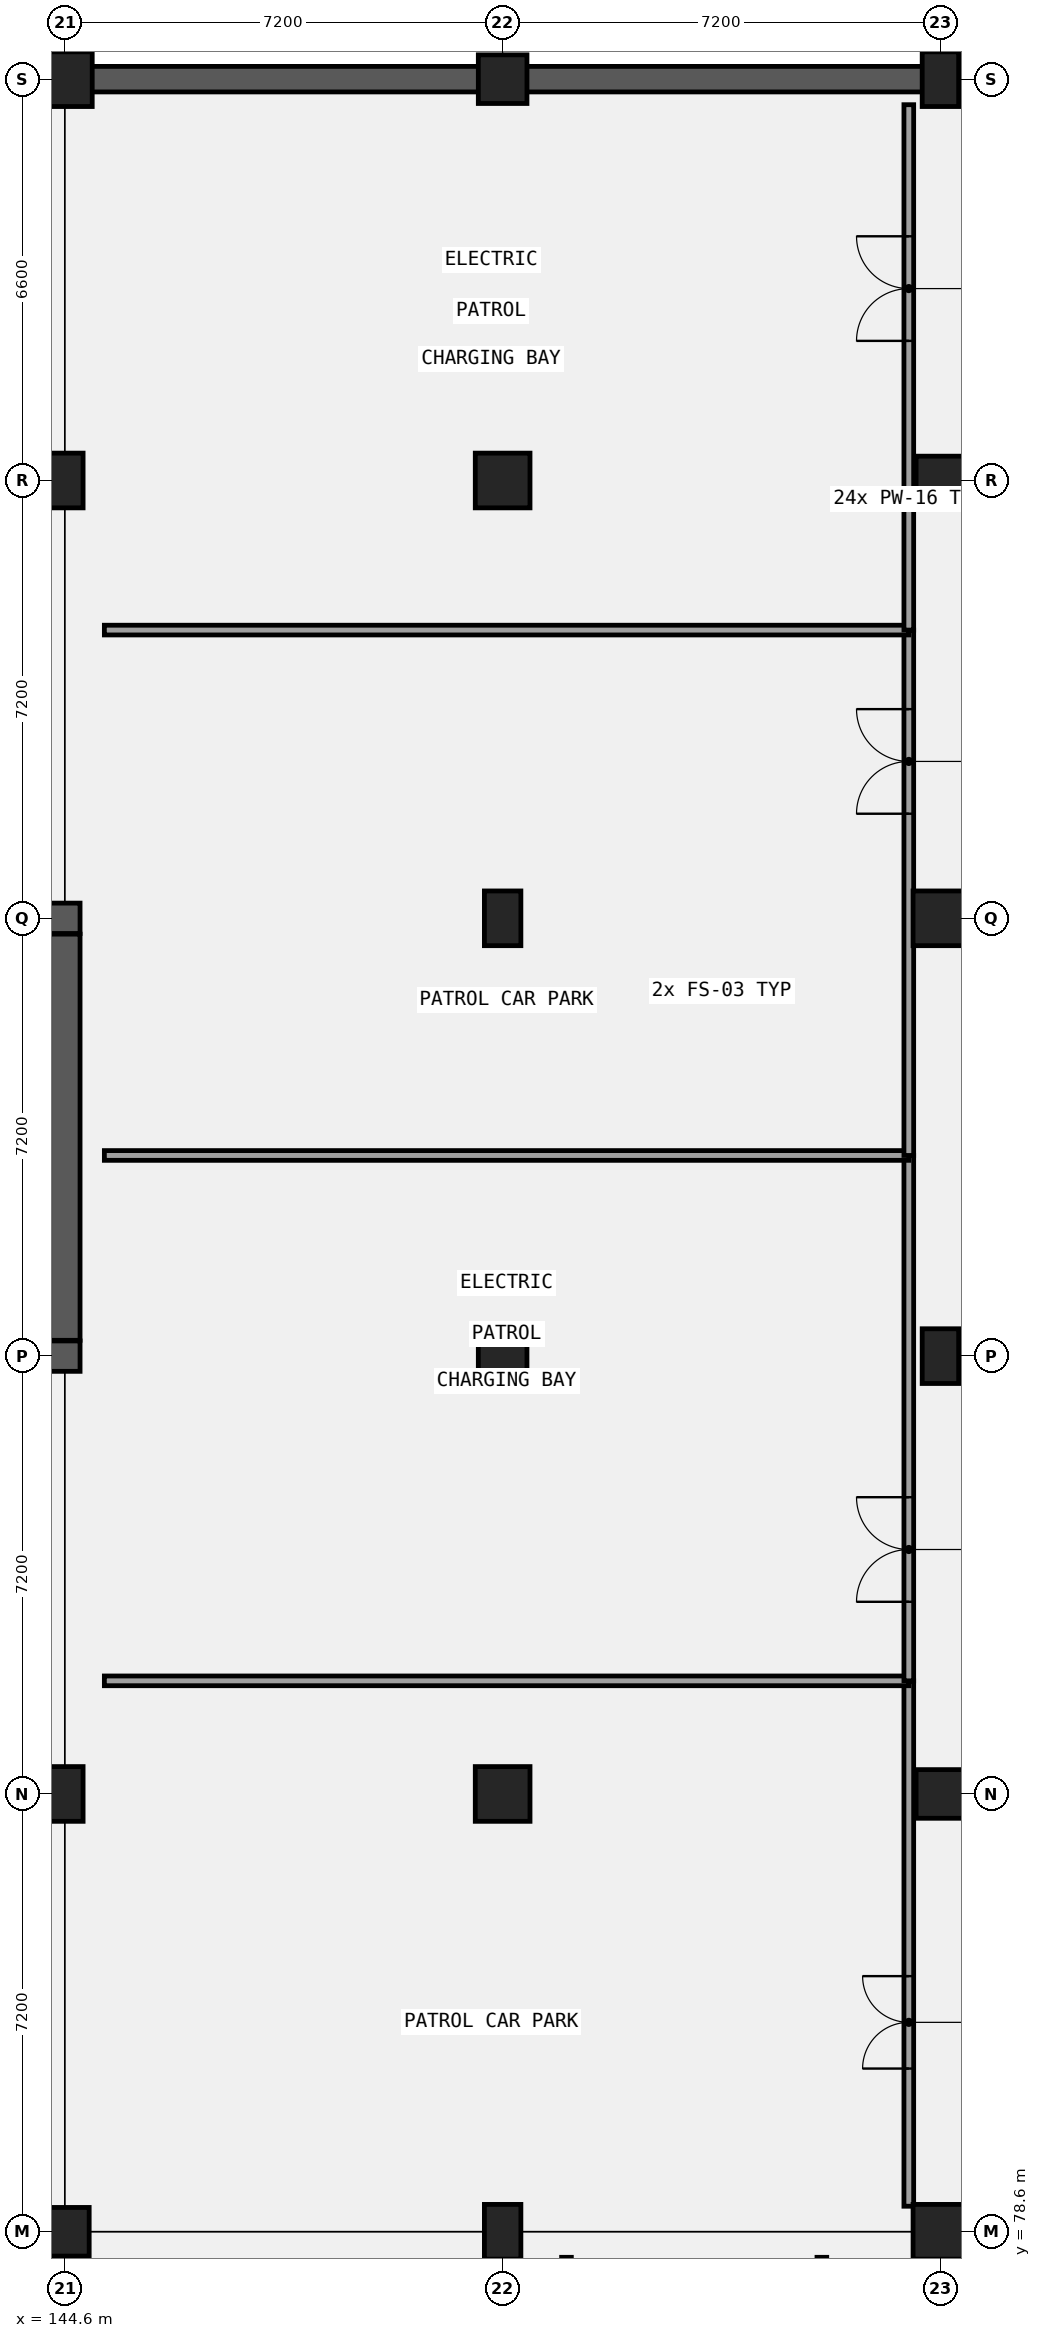
"""IFC4 building model, lengths in metres.
Left out: names, types, materials, properties, quantities, classifications, styles, units other than length and angle.
Written with IfcOpenShell. Run it as: python <this file> out.ifc"""

import sys

from ifc_helpers import new_model, si_unit, direction, frame, frame_2d, origin, origin_2d, place, context, subcontext, project, spatial, rectangle, extrude, element, fill, save


model = new_model("IFC4")
c1 = context("Model", 3, precision=1e-05, world=origin(), true_north=direction((0.0, 1.0)))
c2 = subcontext(c1, "Body", "Model", "MODEL_VIEW")
j1 = project(units=[si_unit("LENGTHUNIT", "METRE"), si_unit("PLANEANGLEUNIT", "RADIAN")], contexts=[c1])
p1 = place(None, origin())
s1 = spatial("IfcSite", under=j1, at=p1, CompositionType="ELEMENT")
p2 = place(p1, origin())
s2 = spatial("IfcBuilding", under=s1, at=p2, CompositionType="ELEMENT")
p3 = place(p2, frame((0.0, 0.0, -4.2)))
s3 = spatial("IfcBuildingStorey", under=s2, at=p3, CompositionType="ELEMENT", Elevation=-4.2)
p4 = place(p3, frame((108.39, 114.0, 0.0), z_axis=(0.0, 0.0, 1.0), x_axis=(1.0, 0.0, 0.0)))
e1 = element("IfcWall", 1, at=p4, inside=s3, PredefinedType="USERDEFINED", context=c2, shape_type="SweptSolid", body=[
    extrude(rectangle(XDim=36.42, YDim=0.42, at=frame_2d((18.21, 0.0))), origin(), (0.0, 0.0, 1.0), 3.13),
])
p5 = place(p3, frame((144.39, 114.0, 0.0), z_axis=(0.0, 0.0, 1.0), x_axis=(1.0, 0.0, 0.0)))
e2 = element("IfcWall", 2, at=p5, inside=s3, PredefinedType="USERDEFINED", context=c2, shape_type="SweptSolid", body=[
    extrude(rectangle(XDim=22.02, YDim=0.42, at=frame_2d((11.01, 0.0))), origin(), (0.0, 0.0, 1.0), 3.13),
])
p6 = place(p3, frame((144.6, 35.6, 0.0), z_axis=(0.0, 0.0, 1.0), x_axis=(0.0, 1.0, 0.0)))
e3 = element("IfcWall", 3, at=p6, inside=s3, PredefinedType="USERDEFINED", context=c2, shape_type="SweptSolid", body=[
    extrude(rectangle(XDim=42.8, YDim=0.42, at=frame_2d((21.4, 0.0))), origin(), (0.0, 0.0, 1.0), 2.98),
])
p7 = place(p3, frame((144.81, 78.6, 0.0), z_axis=(0.0, 0.0, 1.0), x_axis=(-1.0, 0.0, 0.0)))
e4 = element("IfcWall", 4, at=p7, inside=s3, PredefinedType="USERDEFINED", context=c2, shape_type="SweptSolid", body=[
    extrude(rectangle(XDim=36.42, YDim=0.42, at=frame_2d((18.21, 0.0))), origin(), (0.0, 0.0, 1.0), 3.13),
])
p8 = place(p3, frame((129.95, 100.2, 0.0), z_axis=(0.0, 0.0, 1.0), x_axis=(1.0, 0.0, 0.0)))
e5 = element("IfcWall", 5, at=p8, inside=s3, PredefinedType="SHEAR", context=c2, shape_type="SweptSolid", body=[
    extrude(rectangle(XDim=14.9, YDim=0.5, at=frame_2d((7.45, 0.0))), origin(), (0.0, 0.0, 1.0), 4.2),
])
p9 = place(p3, frame((129.95, 93.0, 0.0), z_axis=(0.0, 0.0, 1.0), x_axis=(1.0, 0.0, 0.0)))
e6 = element("IfcWall", 6, at=p9, inside=s3, PredefinedType="SHEAR", context=c2, shape_type="SweptSolid", body=[
    extrude(rectangle(XDim=14.9, YDim=0.5, at=frame_2d((7.45, 0.0))), origin(), (0.0, 0.0, 1.0), 4.2),
])
p10 = place(p9, frame((3.8, 0.0, 0.0)))
e7 = element("IfcOpeningElement", 7, at=p10, cuts=e6, PredefinedType="OPENING", context=c2, shape_type="SweptSolid", body=[
    extrude(rectangle(XDim=1.3, YDim=2.2, at=frame_2d((0.65, 1.1))), frame((0.0, 0.26, 0.0), z_axis=(0.0, -1.0, 0.0), x_axis=(1.0, 0.0, 0.0)), (0.0, 0.0, 1.0), 0.52),
])
p11 = place(p9, frame((11.8, 0.0, 0.0)))
e8 = element("IfcOpeningElement", 8, at=p11, cuts=e6, PredefinedType="OPENING", context=c2, shape_type="SweptSolid", body=[
    extrude(rectangle(XDim=1.3, YDim=2.2, at=frame_2d((0.65, 1.1))), frame((0.0, 0.26, 0.0), z_axis=(0.0, -1.0, 0.0), x_axis=(1.0, 0.0, 0.0)), (0.0, 0.0, 1.0), 0.52),
])
p12 = place(p3, frame((144.6, 93.26, 0.0), z_axis=(0.0, 0.0, 1.0), x_axis=(0.0, 1.0, 0.0)))
e9 = element("IfcWall", 9, at=p12, inside=s3, PredefinedType="SHEAR", context=c2, shape_type="SweptSolid", body=[
    extrude(rectangle(XDim=6.68, YDim=0.5, at=frame_2d((3.34, 0.0))), origin(), (0.0, 0.0, 1.0), 4.2),
])
p13 = place(p3, frame((144.6, 78.6, 0.0), z_axis=(0.0, 0.0, 1.0), x_axis=(1.0, 0.0, 0.0)))
e10 = element("IfcColumn", 10, at=p13, inside=s3, PredefinedType="COLUMN", context=c2, shape_type="SweptSolid", body=[
    extrude(rectangle(XDim=0.8, YDim=0.8, at=origin_2d()), origin(), (0.0, 0.0, 1.0), 4.2),
])
for number, where, z_axis, x_axis in (
    (11, (144.6, 85.8, 0.0), (0.0, 0.0, 1.0), (1.0, 0.0, 0.0)),
    (12, (144.6, 107.4, 0.0), (0.0, 0.0, 1.0), (1.0, 0.0, 0.0)),
):
    element("IfcColumn", number, at=place(p3, frame(where, z_axis=z_axis, x_axis=x_axis)), inside=s3, PredefinedType="COLUMN", context=c2, shape_type="SweptSolid", body=[
        extrude(rectangle(XDim=0.6, YDim=0.9, at=origin_2d()), origin(), (0.0, 0.0, 1.0), 4.2),
    ])
p14 = place(p3, frame((144.6, 114.0, 0.0), z_axis=(0.0, 0.0, 1.0), x_axis=(1.0, 0.0, 0.0)))
e13 = element("IfcColumn", 13, at=p14, inside=s3, PredefinedType="COLUMN", context=c2, shape_type="SweptSolid", body=[
    extrude(rectangle(XDim=0.9, YDim=0.9, at=origin_2d()), origin(), (0.0, 0.0, 1.0), 4.2),
])
p15 = place(p3, frame((151.8, 78.6, 0.0), z_axis=(0.0, 0.0, 1.0), x_axis=(1.0, 0.0, 0.0)))
e14 = element("IfcColumn", 14, at=p15, inside=s3, PredefinedType="COLUMN", context=c2, shape_type="SweptSolid", body=[
    extrude(rectangle(XDim=0.6, YDim=0.9, at=origin_2d()), origin(), (0.0, 0.0, 1.0), 4.2),
])
p16 = place(p3, frame((151.8, 85.8, 0.0), z_axis=(0.0, 0.0, 1.0), x_axis=(1.0, 0.0, 0.0)))
e15 = element("IfcColumn", 15, at=p16, inside=s3, PredefinedType="COLUMN", context=c2, shape_type="SweptSolid", body=[
    extrude(rectangle(XDim=0.9, YDim=0.9, at=origin_2d()), origin(), (0.0, 0.0, 1.0), 4.2),
])
p17 = place(p3, frame((151.8, 93.0, 0.0), z_axis=(0.0, 0.0, 1.0), x_axis=(1.0, 0.0, 0.0)))
e16 = element("IfcColumn", 16, at=p17, inside=s3, PredefinedType="COLUMN", context=c2, shape_type="SweptSolid", body=[
    extrude(rectangle(XDim=0.8, YDim=0.8, at=origin_2d()), origin(), (0.0, 0.0, 1.0), 4.2),
])
p18 = place(p3, frame((151.8, 100.2, 0.0), z_axis=(0.0, 0.0, 1.0), x_axis=(1.0, 0.0, 0.0)))
e17 = element("IfcColumn", 17, at=p18, inside=s3, PredefinedType="COLUMN", context=c2, shape_type="SweptSolid", body=[
    extrude(rectangle(XDim=0.6, YDim=0.9, at=origin_2d()), origin(), (0.0, 0.0, 1.0), 4.2),
])
p19 = place(p3, frame((151.8, 107.4, 0.0), z_axis=(0.0, 0.0, 1.0), x_axis=(1.0, 0.0, 0.0)))
e18 = element("IfcColumn", 18, at=p19, inside=s3, PredefinedType="COLUMN", context=c2, shape_type="SweptSolid", body=[
    extrude(rectangle(XDim=0.9, YDim=0.9, at=origin_2d()), origin(), (0.0, 0.0, 1.0), 4.2),
])
p20 = place(p3, frame((151.8, 114.0, 0.0), z_axis=(0.0, 0.0, 1.0), x_axis=(1.0, 0.0, 0.0)))
e19 = element("IfcColumn", 19, at=p20, inside=s3, PredefinedType="COLUMN", context=c2, shape_type="SweptSolid", body=[
    extrude(rectangle(XDim=0.8, YDim=0.8, at=origin_2d()), origin(), (0.0, 0.0, 1.0), 4.2),
])
p21 = place(p3, frame((159.0, 78.6, 0.0), z_axis=(0.0, 0.0, 1.0), x_axis=(1.0, 0.0, 0.0)))
e20 = element("IfcColumn", 20, at=p21, inside=s3, PredefinedType="COLUMN", context=c2, shape_type="SweptSolid", body=[
    extrude(rectangle(XDim=0.9, YDim=0.9, at=origin_2d()), origin(), (0.0, 0.0, 1.0), 4.2),
])
p22 = place(p3, frame((159.0, 85.8, 0.0), z_axis=(0.0, 0.0, 1.0), x_axis=(1.0, 0.0, 0.0)))
e21 = element("IfcColumn", 21, at=p22, inside=s3, PredefinedType="COLUMN", context=c2, shape_type="SweptSolid", body=[
    extrude(rectangle(XDim=0.8, YDim=0.8, at=origin_2d()), origin(), (0.0, 0.0, 1.0), 4.2),
])
p23 = place(p3, frame((159.0, 93.0, 0.0), z_axis=(0.0, 0.0, 1.0), x_axis=(1.0, 0.0, 0.0)))
e22 = element("IfcColumn", 22, at=p23, inside=s3, PredefinedType="COLUMN", context=c2, shape_type="SweptSolid", body=[
    extrude(rectangle(XDim=0.6, YDim=0.9, at=origin_2d()), origin(), (0.0, 0.0, 1.0), 4.2),
])
p24 = place(p3, frame((159.0, 100.2, 0.0), z_axis=(0.0, 0.0, 1.0), x_axis=(1.0, 0.0, 0.0)))
e23 = element("IfcColumn", 23, at=p24, inside=s3, PredefinedType="COLUMN", context=c2, shape_type="SweptSolid", body=[
    extrude(rectangle(XDim=0.9, YDim=0.9, at=origin_2d()), origin(), (0.0, 0.0, 1.0), 4.2),
])
p25 = place(p3, frame((159.0, 107.4, 0.0), z_axis=(0.0, 0.0, 1.0), x_axis=(1.0, 0.0, 0.0)))
e24 = element("IfcColumn", 24, at=p25, inside=s3, PredefinedType="COLUMN", context=c2, shape_type="SweptSolid", body=[
    extrude(rectangle(XDim=0.8, YDim=0.8, at=origin_2d()), origin(), (0.0, 0.0, 1.0), 4.2),
])
p26 = place(p3, frame((159.0, 114.0, 0.0), z_axis=(0.0, 0.0, 1.0), x_axis=(1.0, 0.0, 0.0)))
e25 = element("IfcColumn", 25, at=p26, inside=s3, PredefinedType="COLUMN", context=c2, shape_type="SweptSolid", body=[
    extrude(rectangle(XDim=0.6, YDim=0.9, at=origin_2d()), origin(), (0.0, 0.0, 1.0), 4.2),
])
p27 = place(p3, frame((158.48, 79.02, 0.0), z_axis=(0.0, 0.0, 1.0), x_axis=(0.0, 1.0, 0.0)))
e26 = element("IfcWall", 26, at=p27, inside=s3, PredefinedType="PARTITIONING", context=c2, shape_type="SweptSolid", body=[
    extrude(rectangle(XDim=8.64, YDim=0.16, at=frame_2d((4.32, 0.0))), origin(), (0.0, 0.0, 1.0), 3.88),
])
p28 = place(p27, frame((2.264, 0.0, 0.0)))
e27 = element("IfcOpeningElement", 27, at=p28, cuts=e26, PredefinedType="OPENING", context=c2, shape_type="SweptSolid", body=[
    extrude(rectangle(XDim=1.52, YDim=2.35, at=frame_2d((0.76, 1.175))), frame((0.0, 0.09, 0.0), z_axis=(0.0, -1.0, 0.0), x_axis=(1.0, 0.0, 0.0)), (0.0, 0.0, 1.0), 0.18),
])
p29 = place(p3, frame((145.25, 87.66, 0.0), z_axis=(0.0, 0.0, 1.0), x_axis=(1.0, 0.0, 0.0)))
e28 = element("IfcWall", 28, at=p29, inside=s3, PredefinedType="PARTITIONING", context=c2, shape_type="SweptSolid", body=[
    extrude(rectangle(XDim=13.23, YDim=0.16, at=frame_2d((6.615, 0.0))), origin(), (0.0, 0.0, 1.0), 3.33),
])
p30 = place(p3, frame((158.48, 87.66, 0.0), z_axis=(0.0, 0.0, 1.0), x_axis=(0.0, 1.0, 0.0)))
e29 = element("IfcWall", 29, at=p30, inside=s3, PredefinedType="PARTITIONING", context=c2, shape_type="SweptSolid", body=[
    extrude(rectangle(XDim=8.64, YDim=0.16, at=frame_2d((4.32, 0.0))), origin(), (0.0, 0.0, 1.0), 3.88),
])
p31 = place(p30, frame((1.3, 0.0, 0.0)))
e30 = element("IfcOpeningElement", 30, at=p31, cuts=e29, PredefinedType="OPENING", context=c2, shape_type="SweptSolid", body=[
    extrude(rectangle(XDim=1.72, YDim=2.1, at=frame_2d((0.86, 1.05))), frame((0.0, 0.09, 0.0), z_axis=(0.0, -1.0, 0.0), x_axis=(1.0, 0.0, 0.0)), (0.0, 0.0, 1.0), 0.18),
])
p32 = place(p3, frame((145.25, 96.3, 0.0), z_axis=(0.0, 0.0, 1.0), x_axis=(1.0, 0.0, 0.0)))
e31 = element("IfcWall", 31, at=p32, inside=s3, PredefinedType="PARTITIONING", context=c2, shape_type="SweptSolid", body=[
    extrude(rectangle(XDim=13.23, YDim=0.16, at=frame_2d((6.615, 0.0))), origin(), (0.0, 0.0, 1.0), 3.88),
])
p33 = place(p3, frame((158.48, 96.3, 0.0), z_axis=(0.0, 0.0, 1.0), x_axis=(0.0, 1.0, 0.0)))
e32 = element("IfcWall", 32, at=p33, inside=s3, PredefinedType="PARTITIONING", context=c2, shape_type="SweptSolid", body=[
    extrude(rectangle(XDim=8.64, YDim=0.16, at=frame_2d((4.32, 0.0))), origin(), (0.0, 0.0, 1.0), 3.88),
])
p34 = place(p33, frame((5.62, 0.0, 0.0)))
e33 = element("IfcOpeningElement", 33, at=p34, cuts=e32, PredefinedType="OPENING", context=c2, shape_type="SweptSolid", body=[
    extrude(rectangle(XDim=1.72, YDim=2.22, at=frame_2d((0.86, 1.11))), frame((0.0, 0.09, 0.0), z_axis=(0.0, -1.0, 0.0), x_axis=(1.0, 0.0, 0.0)), (0.0, 0.0, 1.0), 0.18),
])
p35 = place(p3, frame((145.25, 104.94, 0.0), z_axis=(0.0, 0.0, 1.0), x_axis=(1.0, 0.0, 0.0)))
e34 = element("IfcWall", 34, at=p35, inside=s3, PredefinedType="PARTITIONING", context=c2, shape_type="SweptSolid", body=[
    extrude(rectangle(XDim=13.23, YDim=0.16, at=frame_2d((6.615, 0.0))), origin(), (0.0, 0.0, 1.0), 3.88),
])
p36 = place(p3, frame((158.48, 104.94, 0.0), z_axis=(0.0, 0.0, 1.0), x_axis=(0.0, 1.0, 0.0)))
e35 = element("IfcWall", 35, at=p36, inside=s3, PredefinedType="PARTITIONING", context=c2, shape_type="SweptSolid", body=[
    extrude(rectangle(XDim=8.64, YDim=0.16, at=frame_2d((4.32, 0.0))), origin(), (0.0, 0.0, 1.0), 3.88),
])
p37 = place(p36, frame((4.756, 0.0, 0.0)))
e36 = element("IfcOpeningElement", 36, at=p37, cuts=e35, PredefinedType="OPENING", context=c2, shape_type="SweptSolid", body=[
    extrude(rectangle(XDim=1.72, YDim=2.35, at=frame_2d((0.86, 1.175))), frame((0.0, 0.09, 0.0), z_axis=(0.0, -1.0, 0.0), x_axis=(1.0, 0.0, 0.0)), (0.0, 0.0, 1.0), 0.18),
])
p38 = place(p3, frame((152.85, 71.248, 0.0), z_axis=(0.0, 0.0, 1.0), x_axis=(0.0, 1.0, 0.0)))
e37 = element("IfcWall", 37, at=p38, inside=s3, PredefinedType="PARTITIONING", context=c2, shape_type="SweptSolid", body=[
    extrude(rectangle(XDim=6.932, YDim=0.16, at=frame_2d((3.466, 0.0))), origin(), (0.0, 0.0, 1.0), 3.88),
])
p39 = place(p38, frame((2.706, 0.0, 0.0)))
e38 = element("IfcOpeningElement", 38, at=p39, cuts=e37, PredefinedType="OPENING", context=c2, shape_type="SweptSolid", body=[
    extrude(rectangle(XDim=1.52, YDim=2.35, at=frame_2d((0.76, 1.175))), frame((0.0, 0.09, 0.0), z_axis=(0.0, -1.0, 0.0), x_axis=(1.0, 0.0, 0.0)), (0.0, 0.0, 1.0), 0.18),
])
p40 = place(p3, frame((157.05, 72.634, 0.0), z_axis=(0.0, 0.0, 1.0), x_axis=(0.0, 1.0, 0.0)))
e39 = element("IfcWall", 39, at=p40, inside=s3, PredefinedType="PARTITIONING", context=c2, shape_type="SweptSolid", body=[
    extrude(rectangle(XDim=5.546, YDim=0.16, at=frame_2d((2.773, 0.0))), origin(), (0.0, 0.0, 1.0), 3.88),
])
p41 = place(p40, frame((2.313, 0.0, 0.0)))
e40 = element("IfcOpeningElement", 40, at=p41, cuts=e39, PredefinedType="OPENING", context=c2, shape_type="SweptSolid", body=[
    extrude(rectangle(XDim=0.92, YDim=2.22, at=frame_2d((0.46, 1.11))), frame((0.0, 0.09, 0.0), z_axis=(0.0, -1.0, 0.0), x_axis=(1.0, 0.0, 0.0)), (0.0, 0.0, 1.0), 0.18),
])
p42 = place(p28, frame((1.52, 0.0, 0.0), z_axis=(0.0, 0.0, 1.0), x_axis=(-1.0, 0.0, 0.0)))
e41 = element("IfcDoor", 41, at=p42, inside=s3, OperationType="DOUBLE_DOOR_SINGLE_SWING", PredefinedType="DOOR", context=c2, shape_type="SweptSolid", body=[
    extrude(rectangle(XDim=1.52, YDim=2.35, at=frame_2d((0.76, 1.175))), frame((0.0, 0.025, 0.0), z_axis=(0.0, -1.0, 0.0), x_axis=(1.0, 0.0, 0.0)), (0.0, 0.0, 1.0), 0.05),
])
fill(e27, e41)
p43 = place(p31, frame((1.72, 0.0, 0.0), z_axis=(0.0, 0.0, 1.0), x_axis=(-1.0, 0.0, 0.0)))
e42 = element("IfcDoor", 42, at=p43, inside=s3, OperationType="DOUBLE_DOOR_SINGLE_SWING", PredefinedType="DOOR", context=c2, shape_type="SweptSolid", body=[
    extrude(rectangle(XDim=1.72, YDim=2.1, at=frame_2d((0.86, 1.05))), frame((0.0, 0.025, 0.0), z_axis=(0.0, -1.0, 0.0), x_axis=(1.0, 0.0, 0.0)), (0.0, 0.0, 1.0), 0.05),
])
fill(e30, e42)
p44 = place(p34, frame((1.72, 0.0, 0.0), z_axis=(0.0, 0.0, 1.0), x_axis=(-1.0, 0.0, 0.0)))
e43 = element("IfcDoor", 43, at=p44, inside=s3, OperationType="DOUBLE_DOOR_SINGLE_SWING", PredefinedType="DOOR", context=c2, shape_type="SweptSolid", body=[
    extrude(rectangle(XDim=1.72, YDim=2.22, at=frame_2d((0.86, 1.11))), frame((0.0, 0.025, 0.0), z_axis=(0.0, -1.0, 0.0), x_axis=(1.0, 0.0, 0.0)), (0.0, 0.0, 1.0), 0.05),
])
fill(e33, e43)
p45 = place(p37, frame((1.72, 0.0, 0.0), z_axis=(0.0, 0.0, 1.0), x_axis=(-1.0, 0.0, 0.0)))
e44 = element("IfcDoor", 44, at=p45, inside=s3, OperationType="DOUBLE_DOOR_SINGLE_SWING", PredefinedType="DOOR", context=c2, shape_type="SweptSolid", body=[
    extrude(rectangle(XDim=1.72, YDim=2.35, at=frame_2d((0.86, 1.175))), frame((0.0, 0.025, 0.0), z_axis=(0.0, -1.0, 0.0), x_axis=(1.0, 0.0, 0.0)), (0.0, 0.0, 1.0), 0.05),
])
fill(e36, e44)
save(model, sys.argv[1])
